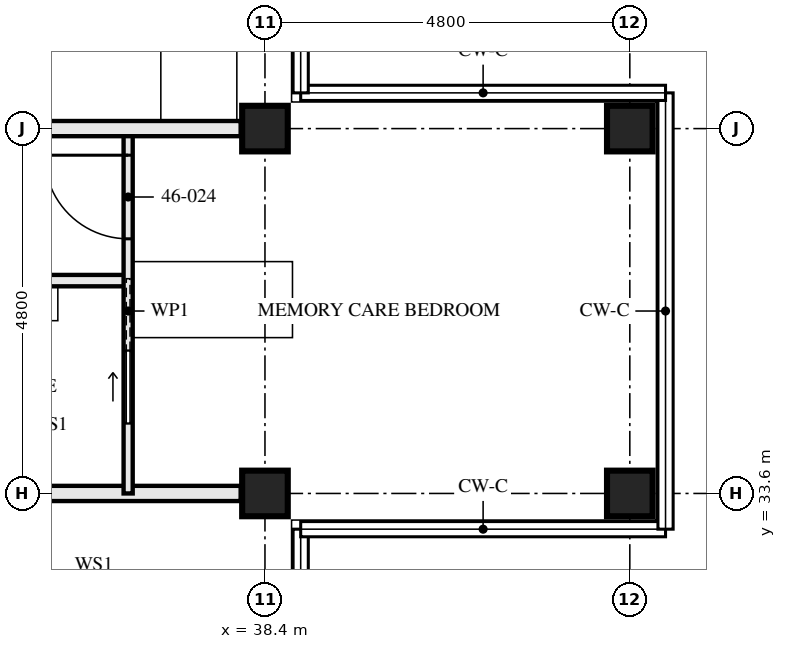
"""IFC4 building model, lengths in metres.
Left out: names, types, materials, properties, quantities, classifications, styles, units other than length and angle.
Written with IfcOpenShell. Run it as: python <this file> out.ifc"""

import sys

from ifc_helpers import new_model, si_unit, direction, frame, frame_2d, origin, origin_2d, place, context, subcontext, project, spatial, rectangle, hollow_rectangle, extrude, element, fill, save


model = new_model("IFC4")
c1 = context("Model", 3, precision=1e-05, world=origin(), true_north=direction((0.0, 1.0)))
c2 = subcontext(c1, "Body", "Model", "MODEL_VIEW")
j1 = project(units=[si_unit("LENGTHUNIT", "METRE"), si_unit("PLANEANGLEUNIT", "RADIAN")], contexts=[c1])
p1 = place(None, origin())
s1 = spatial("IfcSite", under=j1, at=p1, CompositionType="ELEMENT")
p2 = place(p1, origin())
s2 = spatial("IfcBuilding", under=s1, at=p2, CompositionType="ELEMENT")
p3 = place(p2, frame((0.0, 0.0, 169.0)))
s3 = spatial("IfcBuildingStorey", under=s2, at=p3, CompositionType="ELEMENT", Elevation=169.0)
for number, where, z_axis, x_axis in (
    (1, (38.4, 33.6, 0.0), (0.0, 0.0, 1.0), (0.0, 1.0, 0.0)),
    (2, (38.4, 38.4, 0.0), (0.0, 0.0, 1.0), (0.0, 1.0, 0.0)),
    (3, (43.2, 33.6, 0.0), (0.0, 0.0, 1.0), (0.0, 1.0, 0.0)),
    (4, (43.2, 38.4, 0.0), (0.0, 0.0, 1.0), (0.0, 1.0, 0.0)),
):
    element("IfcColumn", number, at=place(p3, frame(where, z_axis=z_axis, x_axis=x_axis)), inside=s3, PredefinedType="COLUMN", context=c2, shape_type="SweptSolid", body=[
        extrude(hollow_rectangle(XDim=0.6, YDim=0.6, WallThickness=0.06, at=origin_2d()), origin(), (0.0, 0.0, 1.0), 3.5),
    ])
p4 = place(p3, frame((38.08, 33.6, 0.0), z_axis=(0.0, 0.0, 1.0), x_axis=(-1.0, 0.0, 0.0)))
e5 = element("IfcWall", 5, at=p4, inside=s3, PredefinedType="PARTITIONING", context=c2, shape_type="SweptSolid", body=[
    extrude(rectangle(XDim=7.28, YDim=0.2, at=frame_2d((3.64, 0.0))), origin(), (0.0, 0.0, 1.0), 2.55),
])
p5 = place(p3, frame((36.6, 36.4, 0.0), z_axis=(0.0, 0.0, 1.0), x_axis=(-1.0, 0.0, 0.0)))
e6 = element("IfcWall", 6, at=p5, inside=s3, PredefinedType="PARTITIONING", context=c2, shape_type="SweptSolid", body=[
    extrude(rectangle(XDim=3.0, YDim=0.15, at=frame_2d((1.5, 0.0))), origin(), (0.0, 0.0, 1.0), 3.33),
])
p6 = place(p3, frame((36.6, 33.6, 0.0), z_axis=(0.0, 0.0, 1.0), x_axis=(0.0, 1.0, 0.0)))
e7 = element("IfcWall", 7, at=p6, inside=s3, PredefinedType="PARTITIONING", context=c2, shape_type="SweptSolid", body=[
    extrude(rectangle(XDim=4.8, YDim=0.12, at=frame_2d((2.4, 0.0))), origin(), (0.0, 0.0, 1.0), 3.33),
])
p7 = place(p6, frame((3.35, 0.0, 0.0)))
e8 = element("IfcOpeningElement", 8, at=p7, cuts=e7, PredefinedType="OPENING", context=c2, shape_type="SweptSolid", body=[
    extrude(rectangle(XDim=1.1, YDim=2.1, at=frame_2d((0.55, 1.05))), frame((0.0, 0.071, 0.0), z_axis=(0.0, -1.0, 0.0), x_axis=(1.0, 0.0, 0.0)), (0.0, 0.0, 1.0), 0.141),
])
p8 = place(p6, frame((0.925, 0.0, 0.0)))
e9 = element("IfcOpeningElement", 9, at=p8, cuts=e7, PredefinedType="OPENING", context=c2, shape_type="SweptSolid", body=[
    extrude(rectangle(XDim=0.95, YDim=2.1, at=frame_2d((0.475, 1.05))), frame((0.0, 0.071, 0.0), z_axis=(0.0, -1.0, 0.0), x_axis=(1.0, 0.0, 0.0)), (0.0, 0.0, 1.0), 0.141),
])
p9 = place(p3, frame((38.08, 38.4, 0.0), z_axis=(0.0, 0.0, 1.0), x_axis=(-1.0, 0.0, 0.0)))
e10 = element("IfcWall", 10, at=p9, inside=s3, PredefinedType="PARTITIONING", context=c2, shape_type="SweptSolid", body=[
    extrude(rectangle(XDim=7.28, YDim=0.2, at=frame_2d((3.64, 0.0))), origin(), (0.0, 0.0, 1.0), 2.55),
])
p10 = place(p7, origin())
e11 = element("IfcDoor", 11, at=p10, inside=s3, OperationType="SINGLE_SWING_LEFT", PredefinedType="DOOR", context=c2, shape_type="SweptSolid", body=[
    extrude(rectangle(XDim=1.1, YDim=2.1, at=frame_2d((0.55, 1.05))), frame((0.0, 0.022, 0.0), z_axis=(0.0, -1.0, 0.0), x_axis=(1.0, 0.0, 0.0)), (0.0, 0.0, 1.0), 0.044),
])
fill(e8, e11)
p11 = place(p8, origin())
e12 = element("IfcDoor", 12, at=p11, inside=s3, OperationType="SLIDING_TO_LEFT", PredefinedType="DOOR", context=c2, shape_type="SweptSolid", body=[
    extrude(rectangle(XDim=0.95, YDim=2.1, at=frame_2d((0.475, 1.05))), frame((0.0, 0.022, 0.0), z_axis=(0.0, -1.0, 0.0), x_axis=(1.0, 0.0, 0.0)), (0.0, 0.0, 1.0), 0.044),
])
fill(e9, e12)
save(model, sys.argv[1])
